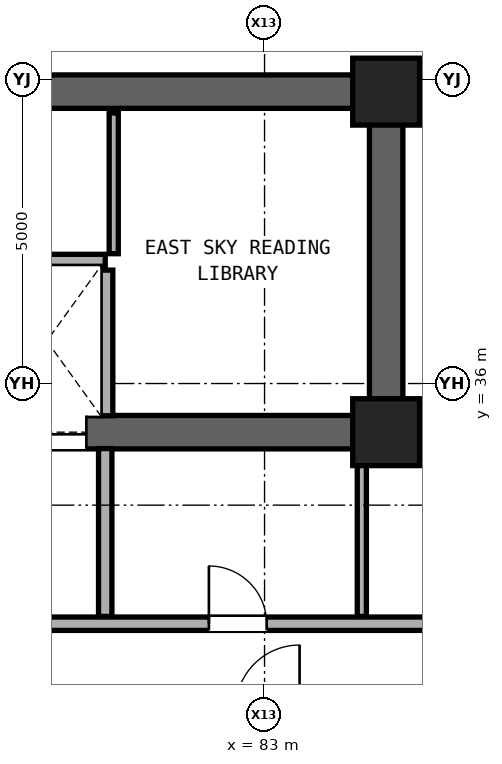
"""IFC4 building model, lengths in metres.
Left out: names, types, materials, properties, quantities, classifications, styles, units other than length and angle.
Written with IfcOpenShell. Run it as: python <this file> out.ifc"""

import sys

from ifc_helpers import new_model, si_unit, direction, frame, frame_2d, origin, origin_2d, place, context, subcontext, project, spatial, rectangle, extrude, element, fill, save


model = new_model("IFC4")
c1 = context("Model", 3, precision=1e-05, world=origin(), true_north=direction((0.0, 1.0)))
c2 = subcontext(c1, "Body", "Model", "MODEL_VIEW")
j1 = project(units=[si_unit("LENGTHUNIT", "METRE"), si_unit("PLANEANGLEUNIT", "RADIAN")], contexts=[c1])
p1 = place(None, origin())
s1 = spatial("IfcSite", under=j1, at=p1, CompositionType="ELEMENT")
p2 = place(p1, origin())
s2 = spatial("IfcBuilding", under=s1, at=p2, CompositionType="ELEMENT")
p3 = place(p2, frame((0.0, 0.0, 141.2)))
s3 = spatial("IfcBuildingStorey", under=s2, at=p3, CompositionType="ELEMENT", Elevation=141.2)
for number, where, z_axis, x_axis in (
    (1, (85.0, 35.2, 0.0), (0.0, 0.0, 1.0), (1.0, 0.0, 0.0)),
    (2, (85.0, 40.8, 0.0), (0.0, 0.0, 1.0), (1.0, 0.0, 0.0)),
):
    element("IfcColumn", number, at=place(p3, frame(where, z_axis=z_axis, x_axis=x_axis)), inside=s3, PredefinedType="COLUMN", context=c2, shape_type="SweptSolid", body=[
        extrude(rectangle(XDim=1.1, YDim=1.1, at=origin_2d()), origin(), (0.0, 0.0, 1.0), 3.3),
    ])
p4 = place(p3, frame((68.0, 40.8, 0.0), z_axis=(0.0, 0.0, 1.0), x_axis=(1.0, 0.0, 0.0)))
e3 = element("IfcWall", 3, at=p4, inside=s3, PredefinedType="SHEAR", context=c2, shape_type="SweptSolid", body=[
    extrude(rectangle(XDim=17.0, YDim=0.55, at=frame_2d((8.5, 0.0))), origin(), (0.0, 0.0, 1.0), 3.08),
])
p5 = place(p3, frame((85.0, 35.2, 0.0), z_axis=(0.0, 0.0, 1.0), x_axis=(0.0, 1.0, 0.0)))
e4 = element("IfcWall", 4, at=p5, inside=s3, PredefinedType="SHEAR", context=c2, shape_type="SweptSolid", body=[
    extrude(rectangle(XDim=5.6, YDim=0.55, at=frame_2d((2.8, 0.0))), origin(), (0.0, 0.0, 1.0), 3.08),
])
p6 = place(p3, frame((68.0, 35.2, 0.0), z_axis=(0.0, 0.0, 1.0), x_axis=(1.0, 0.0, 0.0)))
e5 = element("IfcWall", 5, at=p6, inside=s3, PredefinedType="SHEAR", context=c2, shape_type="SweptSolid", body=[
    extrude(rectangle(XDim=17.0, YDim=0.55, at=frame_2d((8.5, 0.0))), origin(), (0.0, 0.0, 1.0), 3.08),
])
p7 = place(p6, frame((1.06, 0.0, 0.0)))
e6 = element("IfcOpeningElement", 6, at=p7, cuts=e5, PredefinedType="OPENING", context=c2, shape_type="SweptSolid", body=[
    extrude(rectangle(XDim=1.15, YDim=2.2, at=frame_2d((0.575, 1.1))), frame((0.0, 0.285, 0.0), z_axis=(0.0, -1.0, 0.0), x_axis=(1.0, 0.0, 0.0)), (0.0, 0.0, 1.0), 0.57),
])
p8 = place(p6, frame((8.75, 0.0, 0.0)))
e7 = element("IfcOpeningElement", 7, at=p8, cuts=e5, PredefinedType="OPENING", context=c2, shape_type="SweptSolid", body=[
    extrude(rectangle(XDim=1.4, YDim=2.35, at=frame_2d((0.7, 1.175))), frame((0.0, 0.285, 0.0), z_axis=(0.0, -1.0, 0.0), x_axis=(1.0, 0.0, 0.0)), (0.0, 0.0, 1.0), 0.57),
])
p9 = place(p6, frame((10.77, 0.0, 0.0)))
e8 = element("IfcOpeningElement", 8, at=p9, cuts=e5, PredefinedType="OPENING", context=c2, shape_type="SweptSolid", body=[
    extrude(rectangle(XDim=1.3, YDim=2.3, at=frame_2d((0.65, 1.15))), frame((0.0, 0.285, 0.0), z_axis=(0.0, -1.0, 0.0), x_axis=(1.0, 0.0, 0.0)), (0.0, 0.0, 1.0), 0.57),
])
p10 = place(p3, frame((71.55, 32.05, 0.0), z_axis=(0.0, 0.0, 1.0), x_axis=(1.0, 0.0, 0.0)))
e9 = element("IfcWall", 9, at=p10, inside=s3, PredefinedType="SOLIDWALL", context=c2, shape_type="SweptSolid", body=[
    extrude(rectangle(XDim=14.63, YDim=0.22, at=frame_2d((7.315, 0.0))), origin(), (0.0, 0.0, 1.0), 2.216),
])
p11 = place(p10, frame((6.065, 0.0, 0.0)))
e10 = element("IfcOpeningElement", 10, at=p11, cuts=e9, PredefinedType="OPENING", context=c2, shape_type="SweptSolid", body=[
    extrude(rectangle(XDim=0.85, YDim=2.01, at=frame_2d((0.425, 1.005))), frame((0.0, 0.12, 0.0), z_axis=(0.0, -1.0, 0.0), x_axis=(1.0, 0.0, 0.0)), (0.0, 0.0, 1.0), 0.24),
])
p12 = place(p10, frame((10.535, 0.0, 0.0)))
e11 = element("IfcOpeningElement", 11, at=p12, cuts=e9, PredefinedType="OPENING", context=c2, shape_type="SweptSolid", body=[
    extrude(rectangle(XDim=0.95, YDim=2.15, at=frame_2d((0.475, 1.075))), frame((0.0, 0.12, 0.0), z_axis=(0.0, -1.0, 0.0), x_axis=(1.0, 0.0, 0.0)), (0.0, 0.0, 1.0), 0.24),
])
p13 = place(p10, frame((1.65, 0.0, 0.0)))
e12 = element("IfcOpeningElement", 12, at=p13, cuts=e9, PredefinedType="OPENING", context=c2, shape_type="SweptSolid", body=[
    extrude(rectangle(XDim=0.85, YDim=2.01, at=frame_2d((0.425, 1.005))), frame((0.0, 0.12, 0.0), z_axis=(0.0, -1.0, 0.0), x_axis=(1.0, 0.0, 0.0)), (0.0, 0.0, 1.0), 0.24),
])
p14 = place(p3, frame((76.72, 38.0, 0.0), z_axis=(0.0, 0.0, 1.0), x_axis=(1.0, 0.0, 0.0)))
e13 = element("IfcWall", 13, at=p14, inside=s3, PredefinedType="SOLIDWALL", context=c2, shape_type="SweptSolid", body=[
    extrude(rectangle(XDim=3.66, YDim=0.25, at=frame_2d((1.83, 0.0))), origin(), (0.0, 0.0, 1.0), 3.08),
])
p15 = place(p3, frame((80.38, 32.17, 0.0), z_axis=(0.0, 0.0, 1.0), x_axis=(0.0, 1.0, 0.0)))
e14 = element("IfcWall", 14, at=p15, inside=s3, PredefinedType="SOLIDWALL", context=c2, shape_type="SweptSolid", body=[
    extrude(rectangle(XDim=2.76, YDim=0.22, at=frame_2d((1.38, 0.0))), origin(), (0.0, 0.0, 1.0), 3.08),
])
p16 = place(p3, frame((80.38, 35.47, 0.0), z_axis=(0.0, 0.0, 1.0), x_axis=(0.0, 1.0, 0.0)))
e15 = element("IfcWall", 15, at=p16, inside=s3, PredefinedType="SOLIDWALL", context=c2, shape_type="SweptSolid", body=[
    extrude(rectangle(XDim=2.395, YDim=0.25, at=frame_2d((1.198, 0.0))), origin(), (0.0, 0.0, 1.0), 3.08),
])
p17 = place(p3, frame((80.52, 38.135, 0.0), z_axis=(0.0, 0.0, 1.0), x_axis=(0.0, 1.0, 0.0)))
e16 = element("IfcWall", 16, at=p17, inside=s3, PredefinedType="PARTITIONING", context=c2, shape_type="SweptSolid", body=[
    extrude(rectangle(XDim=2.315, YDim=0.15, at=frame_2d((1.157, 0.0))), origin(), (0.0, 0.0, 1.0), 3.08),
])
p18 = place(p3, frame((84.6, 32.17, 0.0), z_axis=(0.0, 0.0, 1.0), x_axis=(0.0, 1.0, 0.0)))
e17 = element("IfcWall", 17, at=p18, inside=s3, PredefinedType="PARTITIONING", context=c2, shape_type="SweptSolid", body=[
    extrude(rectangle(XDim=2.76, YDim=0.15, at=frame_2d((1.38, 0.0))), origin(), (0.0, 0.0, 1.0), 3.08),
])
p19 = place(p12, origin())
e18 = element("IfcDoor", 18, at=p19, inside=s3, OperationType="SINGLE_SWING_LEFT", PredefinedType="DOOR", context=c2, shape_type="SweptSolid", body=[
    extrude(rectangle(XDim=0.95, YDim=2.15, at=frame_2d((0.475, 1.075))), frame((0.0, 0.025, 0.0), z_axis=(0.0, -1.0, 0.0), x_axis=(1.0, 0.0, 0.0)), (0.0, 0.0, 1.0), 0.05),
])
fill(e11, e18)
p20 = place(p9, origin())
e19 = element("IfcDoor", 19, at=p20, inside=s3, OperationType="DOUBLE_DOOR_SLIDING", PredefinedType="DOOR", context=c2, shape_type="SweptSolid", body=[
    extrude(rectangle(XDim=1.3, YDim=2.3, at=frame_2d((0.65, 1.15))), frame((0.0, 0.025, 0.0), z_axis=(0.0, -1.0, 0.0), x_axis=(1.0, 0.0, 0.0)), (0.0, 0.0, 1.0), 0.05),
])
fill(e8, e19)
save(model, sys.argv[1])
